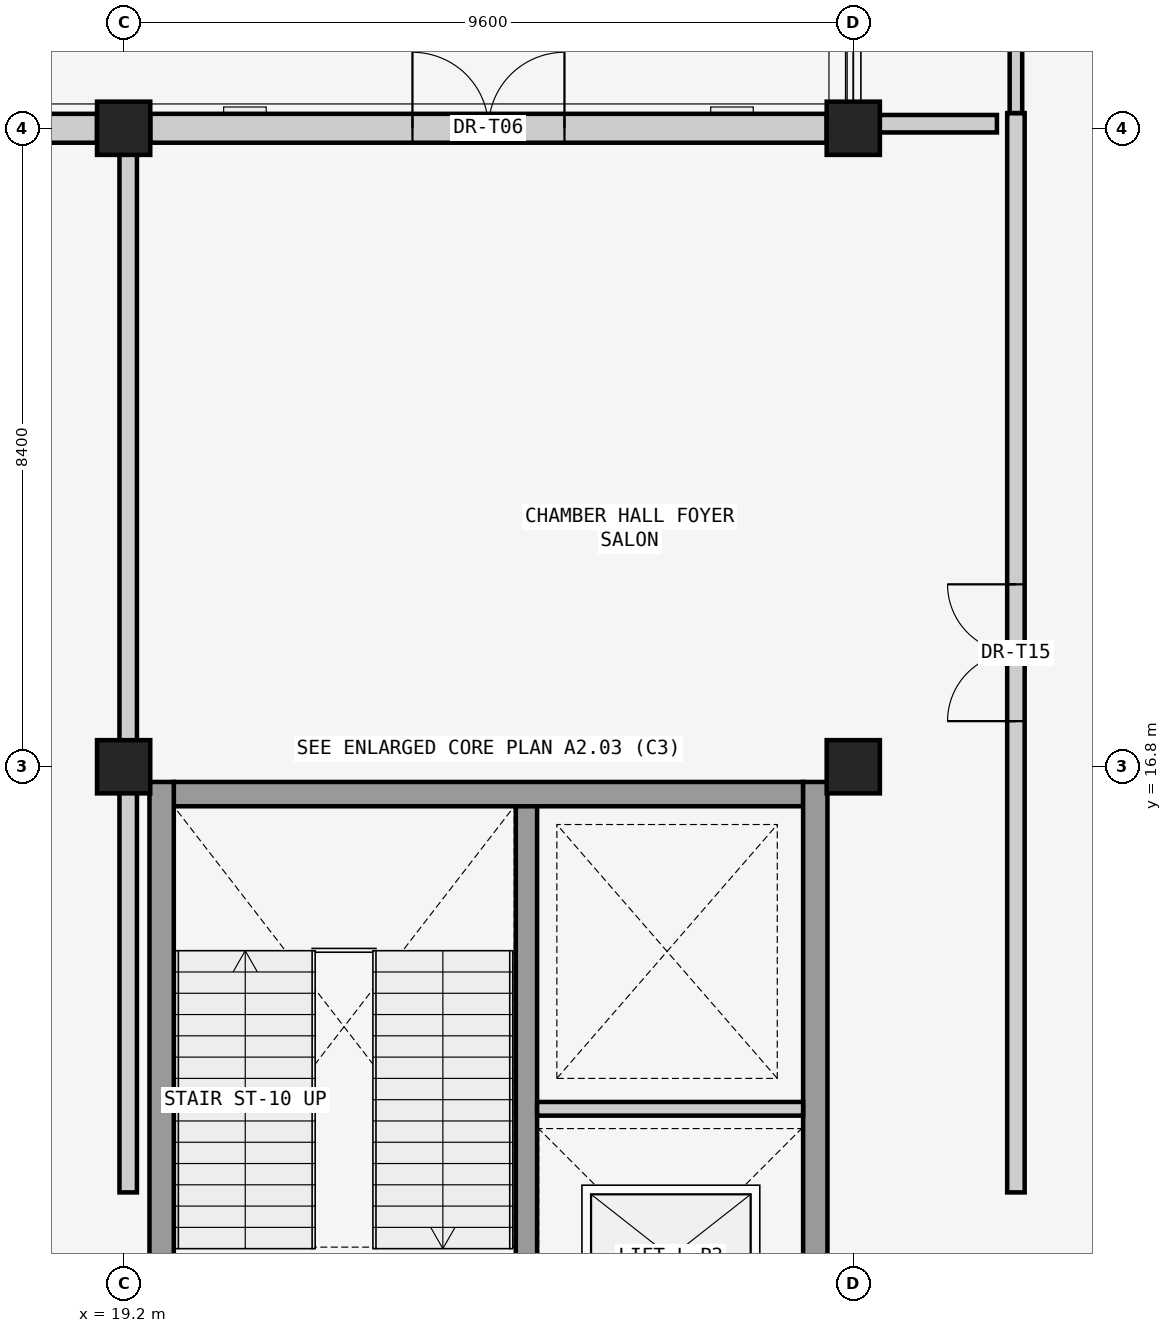
"""IFC4 building model, lengths in metres.
Left out: names, types, materials, properties, quantities, classifications, styles, units other than length and angle.
Written with IfcOpenShell. Run it as: python <this file> out.ifc"""

import sys

from ifc_helpers import new_model, si_unit, direction, frame, frame_2d, origin, origin_2d, place, context, subcontext, project, spatial, rectangle, extrude, element, fill, save


model = new_model("IFC4")
c1 = context("Model", 3, precision=1e-05, world=origin(), true_north=direction((0.0, 1.0)))
c2 = subcontext(c1, "Body", "Model", "MODEL_VIEW")
j1 = project(units=[si_unit("LENGTHUNIT", "METRE"), si_unit("PLANEANGLEUNIT", "RADIAN")], contexts=[c1])
p1 = place(None, origin())
s1 = spatial("IfcSite", under=j1, at=p1, CompositionType="ELEMENT")
p2 = place(p1, origin())
s2 = spatial("IfcBuilding", under=s1, at=p2, CompositionType="ELEMENT")
p3 = place(p2, origin())
s3 = spatial("IfcBuildingStorey", under=s2, at=p3, CompositionType="ELEMENT", Elevation=0.0)
for number, where, z_axis, x_axis in (
    (1, (19.2, 16.8, 0.0), (0.0, 0.0, 1.0), (1.0, 0.0, 0.0)),
    (2, (19.2, 25.2, 0.0), (0.0, 0.0, 1.0), (1.0, 0.0, 0.0)),
    (3, (28.8, 16.8, 0.0), (0.0, 0.0, 1.0), (1.0, 0.0, 0.0)),
    (4, (28.8, 25.2, 0.0), (0.0, 0.0, 1.0), (1.0, 0.0, 0.0)),
):
    element("IfcColumn", number, at=place(p3, frame(where, z_axis=z_axis, x_axis=x_axis)), inside=s3, PredefinedType="COLUMN", context=c2, shape_type="SweptSolid", body=[
        extrude(rectangle(XDim=0.7, YDim=0.7, at=origin_2d()), origin(), (0.0, 0.0, 1.0), 5.12),
    ])
p4 = place(p3, frame((9.95, 25.2, 0.0), z_axis=(0.0, 0.0, 1.0), x_axis=(1.0, 0.0, 0.0)))
e5 = element("IfcWall", 5, at=p4, inside=s3, PredefinedType="SOLIDWALL", context=c2, shape_type="SweptSolid", body=[
    extrude(rectangle(XDim=8.9, YDim=0.38, at=frame_2d((4.45, 0.0))), origin(), (0.0, 0.0, 1.0), 4.5),
])
p5 = place(p4, frame((3.84, 0.0, 0.0)))
e6 = element("IfcOpeningElement", 6, at=p5, cuts=e5, PredefinedType="OPENING", context=c2, shape_type="SweptSolid", body=[
    extrude(rectangle(XDim=1.22, YDim=2.25, at=frame_2d((0.61, 1.125))), frame((0.0, 0.2, 0.0), z_axis=(0.0, -1.0, 0.0), x_axis=(1.0, 0.0, 0.0)), (0.0, 0.0, 1.0), 0.4),
])
p6 = place(p3, frame((19.55, 25.2, 0.0), z_axis=(0.0, 0.0, 1.0), x_axis=(1.0, 0.0, 0.0)))
e7 = element("IfcWall", 7, at=p6, inside=s3, PredefinedType="SOLIDWALL", context=c2, shape_type="SweptSolid", body=[
    extrude(rectangle(XDim=8.9, YDim=0.38, at=frame_2d((4.45, 0.0))), origin(), (0.0, 0.0, 1.0), 4.5),
])
p7 = place(p6, frame((3.45, 0.0, 0.0)))
e8 = element("IfcOpeningElement", 8, at=p7, cuts=e7, PredefinedType="OPENING", context=c2, shape_type="SweptSolid", body=[
    extrude(rectangle(XDim=2.0, YDim=2.25, at=frame_2d((1.0, 1.125))), frame((0.0, 0.2, 0.0), z_axis=(0.0, -1.0, 0.0), x_axis=(1.0, 0.0, 0.0)), (0.0, 0.0, 1.0), 0.4),
])
p8 = place(p3, frame((28.14, 16.44, 0.0), z_axis=(0.0, 0.0, 1.0), x_axis=(-1.0, 0.0, 0.0)))
e9 = element("IfcWall", 9, at=p8, inside=s3, PredefinedType="SHEAR", context=c2, shape_type="SweptSolid", body=[
    extrude(rectangle(XDim=8.28, YDim=0.32, at=frame_2d((4.14, 0.0))), origin(), (0.0, 0.0, 1.0), 5.1),
])
for number, where, z_axis, x_axis in (
    (10, (19.7, 16.6, 0.0), (0.0, 0.0, 1.0), (0.0, -1.0, 0.0)),
    (11, (28.3, 8.24, 0.0), (0.0, 0.0, 1.0), (0.0, 1.0, 0.0)),
):
    element("IfcWall", number, at=place(p3, frame(where, z_axis=z_axis, x_axis=x_axis)), inside=s3, PredefinedType="SHEAR", context=c2, shape_type="SweptSolid", body=[
        extrude(rectangle(XDim=8.36, YDim=0.32, at=frame_2d((4.18, 0.0))), origin(), (0.0, 0.0, 1.0), 5.1),
    ])
p9 = place(p3, frame((24.5, 8.56, 0.0), z_axis=(0.0, 0.0, 1.0), x_axis=(0.0, 1.0, 0.0)))
e12 = element("IfcWall", 12, at=p9, inside=s3, PredefinedType="SHEAR", context=c2, shape_type="SweptSolid", body=[
    extrude(rectangle(XDim=7.72, YDim=0.28, at=frame_2d((3.86, 0.0))), origin(), (0.0, 0.0, 1.0), 5.1),
])
p10 = place(p3, frame((24.64, 12.3, 0.0), z_axis=(0.0, 0.0, 1.0), x_axis=(1.0, 0.0, 0.0)))
e13 = element("IfcWall", 13, at=p10, inside=s3, PredefinedType="SOLIDWALL", context=c2, shape_type="SweptSolid", body=[
    extrude(rectangle(XDim=3.5, YDim=0.18, at=frame_2d((1.75, 0.0))), origin(), (0.0, 0.0, 1.0), 5.1),
])
p11 = place(p3, frame((30.94, 11.2, 0.0), z_axis=(0.0, 0.0, 1.0), x_axis=(0.0, 1.0, 0.0)))
e14 = element("IfcWall", 14, at=p11, inside=s3, PredefinedType="SOLIDWALL", context=c2, shape_type="SweptSolid", body=[
    extrude(rectangle(XDim=14.2, YDim=0.23, at=frame_2d((7.1, 0.0))), origin(), (0.0, 0.0, 1.0), 4.99),
])
p12 = place(p11, frame((6.2, 0.0, 0.0)))
e15 = element("IfcOpeningElement", 15, at=p12, cuts=e14, PredefinedType="OPENING", context=c2, shape_type="SweptSolid", body=[
    extrude(rectangle(XDim=1.8, YDim=2.3, at=frame_2d((0.9, 1.15))), frame((0.0, 0.125, 0.0), z_axis=(0.0, -1.0, 0.0), x_axis=(1.0, 0.0, 0.0)), (0.0, 0.0, 1.0), 0.25),
])
p13 = place(p3, frame((30.94, 25.4, 0.0), z_axis=(0.0, 0.0, 1.0), x_axis=(0.0, 1.0, 0.0)))
e16 = element("IfcWall", 16, at=p13, inside=s3, PredefinedType="PARTITIONING", context=c2, shape_type="SweptSolid", body=[
    extrude(rectangle(XDim=55.0, YDim=0.165, at=frame_2d((27.5, 0.0))), origin(), (0.0, 0.0, 1.0), 4.99),
])
p14 = place(p13, frame((27.025, 0.0, 0.0)))
e17 = element("IfcOpeningElement", 17, at=p14, cuts=e16, PredefinedType="OPENING", context=c2, shape_type="SweptSolid", body=[
    extrude(rectangle(XDim=0.95, YDim=2.15, at=frame_2d((0.475, 1.075))), frame((0.0, 0.093, 0.0), z_axis=(0.0, -1.0, 0.0), x_axis=(1.0, 0.0, 0.0)), (0.0, 0.0, 1.0), 0.185),
])
p15 = place(p3, frame((19.26, 11.2, 0.0), z_axis=(0.0, 0.0, 1.0), x_axis=(0.0, 1.0, 0.0)))
e18 = element("IfcWall", 18, at=p15, inside=s3, PredefinedType="SOLIDWALL", context=c2, shape_type="SweptSolid", body=[
    extrude(rectangle(XDim=13.78, YDim=0.23, at=frame_2d((6.89, 0.0))), origin(), (0.0, 0.0, 1.0), 4.4),
])
p16 = place(p3, frame((29.02, 25.26, 0.0), z_axis=(0.0, 0.0, 1.0), x_axis=(1.0, 0.0, 0.0)))
e19 = element("IfcWall", 19, at=p16, inside=s3, PredefinedType="SOLIDWALL", context=c2, shape_type="SweptSolid", body=[
    extrude(rectangle(XDim=1.67, YDim=0.23, at=frame_2d((0.835, 0.0))), origin(), (0.0, 0.0, 1.0), 4.15),
])
p17 = place(p7, origin())
e20 = element("IfcDoor", 20, at=p17, inside=s3, OperationType="DOUBLE_DOOR_SINGLE_SWING", PredefinedType="DOOR", context=c2, shape_type="SweptSolid", body=[
    extrude(rectangle(XDim=2.0, YDim=2.25, at=frame_2d((1.0, 1.125))), frame((0.0, 0.025, 0.0), z_axis=(0.0, -1.0, 0.0), x_axis=(1.0, 0.0, 0.0)), (0.0, 0.0, 1.0), 0.05),
])
fill(e8, e20)
p18 = place(p12, origin())
e21 = element("IfcDoor", 21, at=p18, inside=s3, OperationType="DOUBLE_SWING_LEFT", PredefinedType="DOOR", context=c2, shape_type="SweptSolid", body=[
    extrude(rectangle(XDim=1.8, YDim=2.3, at=frame_2d((0.9, 1.15))), frame((0.0, 0.025, 0.0), z_axis=(0.0, -1.0, 0.0), x_axis=(1.0, 0.0, 0.0)), (0.0, 0.0, 1.0), 0.05),
])
fill(e15, e21)
save(model, sys.argv[1])
